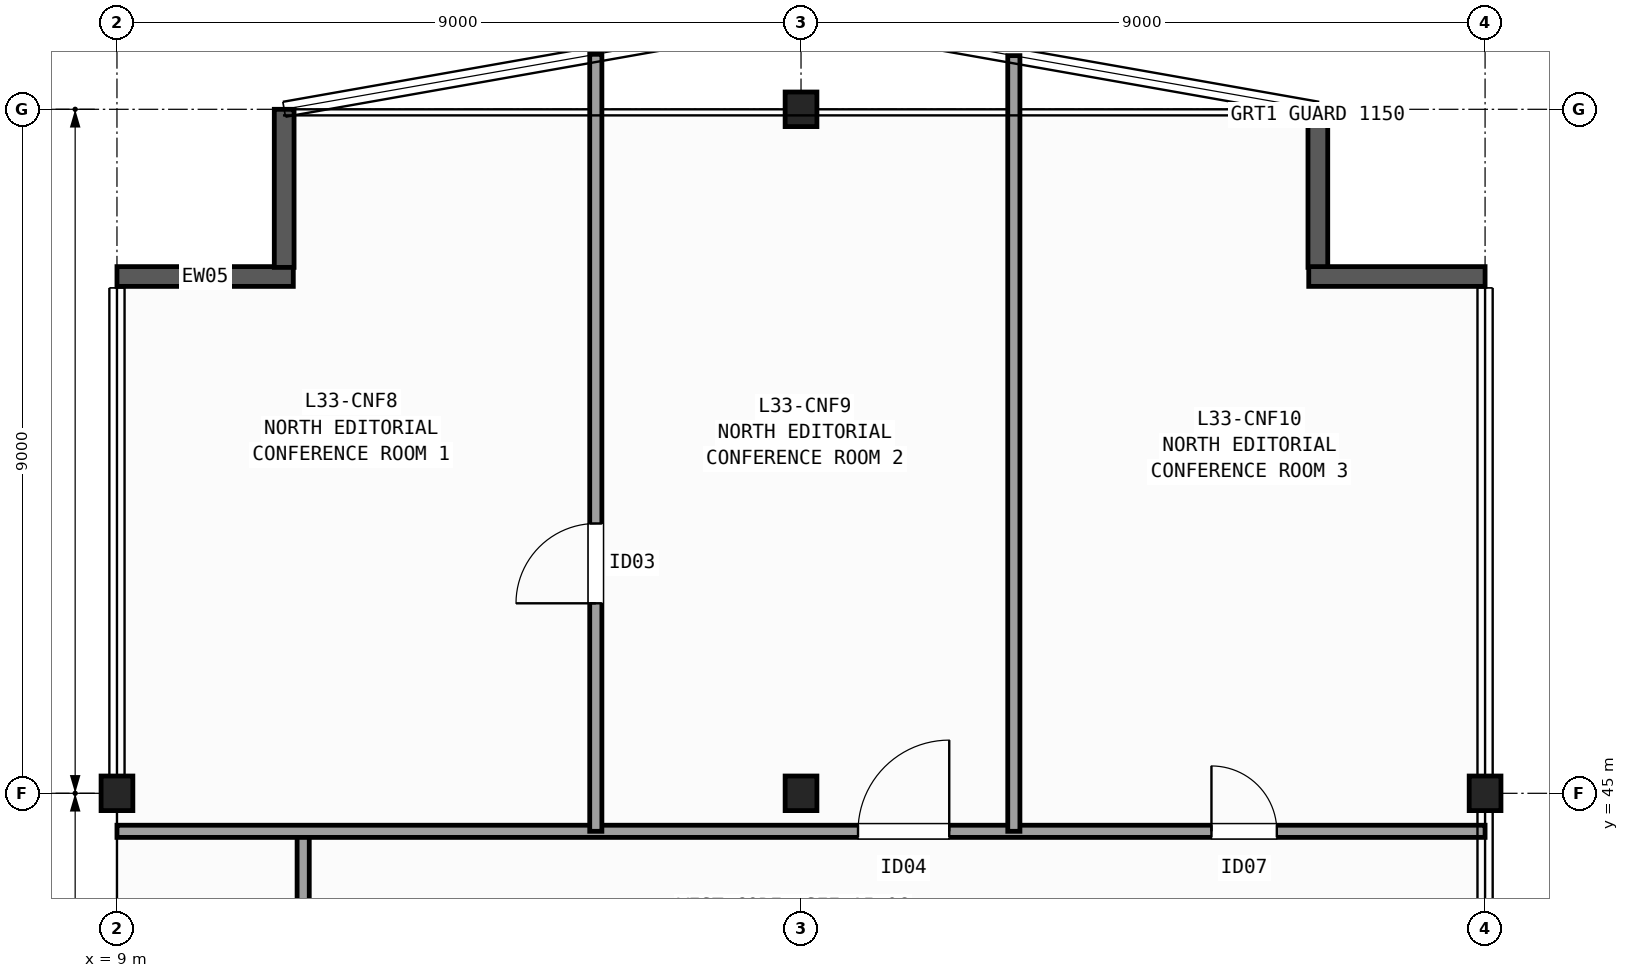
"""IFC4 building model, lengths in metres.
Left out: names, types, materials, properties, quantities, classifications, styles, units other than length and angle.
Written with IfcOpenShell. Run it as: python <this file> out.ifc"""

import sys

from ifc_helpers import new_model, si_unit, direction, frame, frame_2d, origin, origin_2d, place, context, subcontext, project, spatial, rectangle, i_section, extrude, element, fill, save


model = new_model("IFC4")
c1 = context("Model", 3, precision=1e-05, world=origin(), true_north=direction((0.0, 1.0)))
c2 = subcontext(c1, "Body", "Model", "MODEL_VIEW")
j1 = project(units=[si_unit("LENGTHUNIT", "METRE"), si_unit("PLANEANGLEUNIT", "RADIAN")], contexts=[c1])
p1 = place(None, origin())
s1 = spatial("IfcSite", under=j1, at=p1, CompositionType="ELEMENT")
p2 = place(p1, origin())
s2 = spatial("IfcBuilding", under=s1, at=p2, CompositionType="ELEMENT")
p3 = place(p2, frame((0.0, 0.0, 135.9)))
s3 = spatial("IfcBuildingStorey", under=s2, at=p3, CompositionType="ELEMENT", Elevation=135.9)
for number, where, z_axis, x_axis in (
    (1, (9.0, 45.0, 0.0), (0.0, 0.0, 1.0), (1.0, 0.0, 0.0)),
    (2, (18.0, 45.0, 0.0), (0.0, 0.0, 1.0), (1.0, 0.0, 0.0)),
    (3, (18.0, 54.0, 0.0), (0.0, 0.0, 1.0), (1.0, 0.0, 0.0)),
    (4, (27.0, 45.0, 0.0), (0.0, 0.0, 1.0), (1.0, 0.0, 0.0)),
):
    element("IfcColumn", number, at=place(p3, frame(where, z_axis=z_axis, x_axis=x_axis)), inside=s3, PredefinedType="COLUMN", context=c2, shape_type="SweptSolid", body=[
        extrude(i_section(OverallWidth=0.418, OverallDepth=0.455, WebThickness=0.042, FlangeThickness=0.068, FilletRadius=0.015, at=origin_2d()), origin(), (0.0, 0.0, 1.0), 3.7),
    ])
p4 = place(p3, frame((9.0, 51.8, 0.0), z_axis=(0.0, 0.0, 1.0), x_axis=(1.0, 0.0, 0.0)))
e5 = element("IfcWall", 5, at=p4, inside=s3, PredefinedType="SOLIDWALL", context=c2, shape_type="SweptSolid", body=[
    extrude(rectangle(XDim=2.32, YDim=0.26, at=frame_2d((1.16, 0.0))), origin(), (0.0, 0.0, 1.0), 3.42),
])
for number, where, z_axis, x_axis in (
    (6, (11.2, 51.92, 0.0), (0.0, 0.0, 1.0), (0.0, 1.0, 0.0)),
    (7, (24.8, 54.0, 0.0), (0.0, 0.0, 1.0), (0.0, -1.0, 0.0)),
):
    element("IfcWall", number, at=place(p3, frame(where, z_axis=z_axis, x_axis=x_axis)), inside=s3, PredefinedType="SOLIDWALL", context=c2, shape_type="SweptSolid", body=[
        extrude(rectangle(XDim=2.08, YDim=0.26, at=frame_2d((1.04, 0.0))), origin(), (0.0, 0.0, 1.0), 3.42),
    ])
p5 = place(p3, frame((24.68, 51.8, 0.0), z_axis=(0.0, 0.0, 1.0), x_axis=(1.0, 0.0, 0.0)))
e8 = element("IfcWall", 8, at=p5, inside=s3, PredefinedType="SOLIDWALL", context=c2, shape_type="SweptSolid", body=[
    extrude(rectangle(XDim=2.32, YDim=0.26, at=frame_2d((1.16, 0.0))), origin(), (0.0, 0.0, 1.0), 3.42),
])
p6 = place(p3, frame((11.45, 42.4, 0.0), z_axis=(0.0, 0.0, 1.0), x_axis=(0.0, 1.0, 0.0)))
e9 = element("IfcWall", 9, at=p6, inside=s3, PredefinedType="PARTITIONING", context=c2, shape_type="SweptSolid", body=[
    extrude(rectangle(XDim=2.1, YDim=0.16, at=frame_2d((1.05, 0.0))), origin(), (0.0, 0.0, 1.0), 3.42),
])
p7 = place(p3, frame((9.0, 44.5, 0.0), z_axis=(0.0, 0.0, 1.0), x_axis=(1.0, 0.0, 0.0)))
e10 = element("IfcWall", 10, at=p7, inside=s3, PredefinedType="PARTITIONING", context=c2, shape_type="SweptSolid", body=[
    extrude(rectangle(XDim=18.0, YDim=0.16, at=frame_2d((9.0, 0.0))), origin(), (0.0, 0.0, 1.0), 2.634),
])
p8 = place(p7, frame((9.75, 0.0, 0.0)))
e11 = element("IfcOpeningElement", 11, at=p8, cuts=e10, PredefinedType="OPENING", context=c2, shape_type="SweptSolid", body=[
    extrude(rectangle(XDim=1.2, YDim=2.15, at=frame_2d((0.6, 1.075))), frame((0.0, 0.09, 0.0), z_axis=(0.0, -1.0, 0.0), x_axis=(1.0, 0.0, 0.0)), (0.0, 0.0, 1.0), 0.18),
])
p9 = place(p7, frame((14.4, 0.0, 0.0)))
e12 = element("IfcOpeningElement", 12, at=p9, cuts=e10, PredefinedType="OPENING", context=c2, shape_type="SweptSolid", body=[
    extrude(rectangle(XDim=0.86, YDim=2.05, at=frame_2d((0.43, 1.025))), frame((0.0, 0.09, 0.0), z_axis=(0.0, -1.0, 0.0), x_axis=(1.0, 0.0, 0.0)), (0.0, 0.0, 1.0), 0.18),
])
p10 = place(p3, frame((15.3, 44.5, 0.0), z_axis=(0.0, 0.0, 1.0), x_axis=(0.0, 1.0, 0.0)))
e13 = element("IfcWall", 13, at=p10, inside=s3, PredefinedType="PARTITIONING", context=c2, shape_type="SweptSolid", body=[
    extrude(rectangle(XDim=10.224, YDim=0.16, at=frame_2d((5.112, 0.0))), origin(), (0.0, 0.0, 1.0), 3.42),
])
p11 = place(p10, frame((3.0, 0.0, 0.0)))
e14 = element("IfcOpeningElement", 14, at=p11, cuts=e13, PredefinedType="OPENING", context=c2, shape_type="SweptSolid", body=[
    extrude(rectangle(XDim=1.05, YDim=2.15, at=frame_2d((0.525, 1.075))), frame((0.0, 0.09, 0.0), z_axis=(0.0, -1.0, 0.0), x_axis=(1.0, 0.0, 0.0)), (0.0, 0.0, 1.0), 0.18),
])
p12 = place(p3, frame((20.8, 44.5, 0.0), z_axis=(0.0, 0.0, 1.0), x_axis=(0.0, 1.0, 0.0)))
e15 = element("IfcWall", 15, at=p12, inside=s3, PredefinedType="PARTITIONING", context=c2, shape_type="SweptSolid", body=[
    extrude(rectangle(XDim=10.206, YDim=0.16, at=frame_2d((5.103, 0.0))), origin(), (0.0, 0.0, 1.0), 3.42),
])
p13 = place(p11, origin())
e16 = element("IfcDoor", 16, at=p13, inside=s3, OperationType="SINGLE_SWING_LEFT", PredefinedType="DOOR", context=c2, shape_type="SweptSolid", body=[
    extrude(rectangle(XDim=1.05, YDim=2.15, at=frame_2d((0.525, 1.075))), frame((0.0, 0.025, 0.0), z_axis=(0.0, -1.0, 0.0), x_axis=(1.0, 0.0, 0.0)), (0.0, 0.0, 1.0), 0.05),
])
fill(e14, e16)
p14 = place(p8, origin())
e17 = element("IfcDoor", 17, at=p14, inside=s3, OperationType="SINGLE_SWING_RIGHT", PredefinedType="DOOR", context=c2, shape_type="SweptSolid", body=[
    extrude(rectangle(XDim=1.2, YDim=2.15, at=frame_2d((0.6, 1.075))), frame((0.0, 0.025, 0.0), z_axis=(0.0, -1.0, 0.0), x_axis=(1.0, 0.0, 0.0)), (0.0, 0.0, 1.0), 0.05),
])
fill(e11, e17)
p15 = place(p9, origin())
e18 = element("IfcDoor", 18, at=p15, inside=s3, OperationType="SINGLE_SWING_LEFT", PredefinedType="DOOR", context=c2, shape_type="SweptSolid", body=[
    extrude(rectangle(XDim=0.86, YDim=2.05, at=frame_2d((0.43, 1.025))), frame((0.0, 0.025, 0.0), z_axis=(0.0, -1.0, 0.0), x_axis=(1.0, 0.0, 0.0)), (0.0, 0.0, 1.0), 0.05),
])
fill(e12, e18)
save(model, sys.argv[1])
